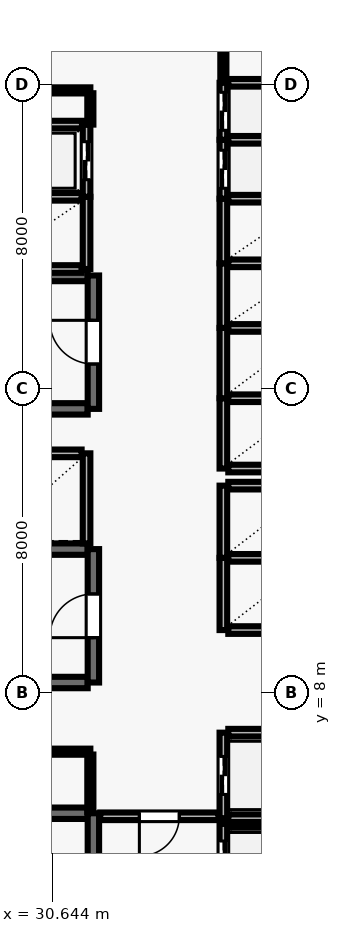
"""IFC4 building model, lengths in metres.
Left out: names, types, materials, properties, quantities, classifications, styles, units other than length and angle.
Written with IfcOpenShell. Run it as: python <this file> out.ifc"""

import sys

from ifc_helpers import new_model, si_unit, direction, frame, frame_2d, origin, place, context, subcontext, project, spatial, rectangle, extrude, element, fill, save


model = new_model("IFC4")
c1 = context("Model", 3, precision=1e-05, world=origin(), true_north=direction((0.0, 1.0)))
c2 = subcontext(c1, "Body", "Model", "MODEL_VIEW")
j1 = project(units=[si_unit("LENGTHUNIT", "METRE"), si_unit("PLANEANGLEUNIT", "RADIAN")], contexts=[c1])
p1 = place(None, origin())
s1 = spatial("IfcSite", under=j1, at=p1, CompositionType="ELEMENT")
p2 = place(p1, origin())
s2 = spatial("IfcBuilding", under=s1, at=p2, CompositionType="ELEMENT")
p3 = place(p2, frame((0.0, 0.0, 62.2)))
s3 = spatial("IfcBuildingStorey", under=s2, at=p3, CompositionType="ELEMENT", Elevation=62.2)
p4 = place(p3, frame((31.58, 4.83, 0.0), z_axis=(0.0, 0.0, 1.0), x_axis=(-1.0, 0.0, 0.0)))
e1 = element("IfcWall", 1, at=p4, inside=s3, PredefinedType="SHEAR", context=c2, shape_type="SweptSolid", body=[
    extrude(rectangle(XDim=8.36, YDim=0.3, at=frame_2d((4.18, 0.0))), origin(), (0.0, 0.0, 1.0), 3.69),
])
p5 = place(p3, frame((31.73, 0.96, 0.0), z_axis=(0.0, 0.0, 1.0), x_axis=(0.0, 1.0, 0.0)))
e2 = element("IfcWall", 2, at=p5, inside=s3, PredefinedType="SHEAR", context=c2, shape_type="SweptSolid", body=[
    extrude(rectangle(XDim=3.87, YDim=0.3, at=frame_2d((1.935, 0.0))), origin(), (0.0, 0.0, 1.0), 3.69),
])
p6 = place(p5, frame((1.54, 0.0, 0.0)))
e3 = element("IfcOpeningElement", 3, at=p6, cuts=e2, PredefinedType="OPENING", context=c2, shape_type="SweptSolid", body=[
    extrude(rectangle(XDim=1.15, YDim=2.15, at=frame_2d((0.575, 1.075))), frame((0.0, 0.16, 0.0), z_axis=(0.0, -1.0, 0.0), x_axis=(1.0, 0.0, 0.0)), (0.0, 0.0, 1.0), 0.32),
])
for number, where, z_axis, x_axis in (
    (4, (31.58, 18.98, 0.0), (0.0, 0.0, 1.0), (-1.0, 0.0, 0.0)),
    (5, (23.22, 15.47, 0.0), (0.0, 0.0, 1.0), (1.0, 0.0, 0.0)),
):
    element("IfcWall", number, at=place(p3, frame(where, z_axis=z_axis, x_axis=x_axis)), inside=s3, PredefinedType="SHEAR", context=c2, shape_type="SweptSolid", body=[
        extrude(rectangle(XDim=8.36, YDim=0.3, at=frame_2d((4.18, 0.0))), origin(), (0.0, 0.0, 1.0), 3.69),
    ])
p7 = place(p3, frame((31.73, 15.47, 0.0), z_axis=(0.0, 0.0, 1.0), x_axis=(0.0, 1.0, 0.0)))
e6 = element("IfcWall", 6, at=p7, inside=s3, PredefinedType="SHEAR", context=c2, shape_type="SweptSolid", body=[
    extrude(rectangle(XDim=3.51, YDim=0.3, at=frame_2d((1.755, 0.0))), origin(), (0.0, 0.0, 1.0), 3.69),
])
p8 = place(p7, frame((1.18, 0.0, 0.0)))
e7 = element("IfcOpeningElement", 7, at=p8, cuts=e6, PredefinedType="OPENING", context=c2, shape_type="SweptSolid", body=[
    extrude(rectangle(XDim=1.15, YDim=2.15, at=frame_2d((0.575, 1.075))), frame((0.0, 0.16, 0.0), z_axis=(0.0, -1.0, 0.0), x_axis=(1.0, 0.0, 0.0)), (0.0, 0.0, 1.0), 0.32),
])
for number, where, z_axis, x_axis in (
    (8, (31.58, 11.78, 0.0), (0.0, 0.0, 1.0), (-1.0, 0.0, 0.0)),
    (9, (23.22, 8.27, 0.0), (0.0, 0.0, 1.0), (1.0, 0.0, 0.0)),
):
    element("IfcWall", number, at=place(p3, frame(where, z_axis=z_axis, x_axis=x_axis)), inside=s3, PredefinedType="SHEAR", context=c2, shape_type="SweptSolid", body=[
        extrude(rectangle(XDim=8.36, YDim=0.3, at=frame_2d((4.18, 0.0))), origin(), (0.0, 0.0, 1.0), 3.69),
    ])
p9 = place(p3, frame((31.73, 8.27, 0.0), z_axis=(0.0, 0.0, 1.0), x_axis=(0.0, 1.0, 0.0)))
e10 = element("IfcWall", 10, at=p9, inside=s3, PredefinedType="SHEAR", context=c2, shape_type="SweptSolid", body=[
    extrude(rectangle(XDim=3.51, YDim=0.3, at=frame_2d((1.755, 0.0))), origin(), (0.0, 0.0, 1.0), 3.69),
])
p10 = place(p9, frame((1.18, 0.0, 0.0)))
e11 = element("IfcOpeningElement", 11, at=p10, cuts=e10, PredefinedType="OPENING", context=c2, shape_type="SweptSolid", body=[
    extrude(rectangle(XDim=1.15, YDim=2.15, at=frame_2d((0.575, 1.075))), frame((0.0, 0.16, 0.0), z_axis=(0.0, -1.0, 0.0), x_axis=(1.0, 0.0, 0.0)), (0.0, 0.0, 1.0), 0.32),
])
p11 = place(p3, frame((35.15, 4.55, 0.0), z_axis=(0.0, 0.0, 1.0), x_axis=(0.0, -1.0, 0.0)))
e12 = element("IfcWall", 12, at=p11, inside=s3, PredefinedType="SOLIDWALL", context=c2, shape_type="SweptSolid", body=[
    extrude(rectangle(XDim=2.1, YDim=0.2, at=frame_2d((1.05, 0.0))), origin(), (0.0, 0.0, 1.0), 3.69),
])
p12 = place(p11, frame((0.45, 0.0, 0.0)))
e13 = element("IfcOpeningElement", 13, at=p12, cuts=e12, PredefinedType="OPENING", context=c2, shape_type="SweptSolid", body=[
    extrude(rectangle(XDim=1.2, YDim=2.15, at=frame_2d((0.6, 1.075))), frame((0.0, 0.11, 0.0), z_axis=(0.0, -1.0, 0.0), x_axis=(1.0, 0.0, 0.0)), (0.0, 0.0, 1.0), 0.22),
])
p13 = place(p3, frame((37.42, 4.55, 0.0), z_axis=(0.0, 0.0, 1.0), x_axis=(-1.0, 0.0, 0.0)))
e14 = element("IfcWall", 14, at=p13, inside=s3, PredefinedType="SOLIDWALL", context=c2, shape_type="SweptSolid", body=[
    extrude(rectangle(XDim=2.14, YDim=0.2, at=frame_2d((1.07, 0.0))), origin(), (0.0, 0.0, 1.0), 3.69),
])
p14 = place(p3, frame((35.15, 6.95, 0.0), z_axis=(0.0, 0.0, 1.0), x_axis=(0.0, -1.0, 0.0)))
e15 = element("IfcWall", 15, at=p14, inside=s3, PredefinedType="SOLIDWALL", context=c2, shape_type="SweptSolid", body=[
    extrude(rectangle(XDim=2.25, YDim=0.2, at=frame_2d((1.125, 0.0))), origin(), (0.0, 0.0, 1.0), 3.69),
])
p15 = place(p14, frame((0.625, 0.0, 0.0)))
e16 = element("IfcOpeningElement", 16, at=p15, cuts=e15, PredefinedType="OPENING", context=c2, shape_type="SweptSolid", body=[
    extrude(rectangle(XDim=1.0, YDim=2.1, at=frame_2d((0.5, 1.05))), frame((0.0, 0.11, 0.0), z_axis=(0.0, -1.0, 0.0), x_axis=(1.0, 0.0, 0.0)), (0.0, 0.0, 1.0), 0.22),
])
for number, where, z_axis, x_axis in (
    (17, (35.28, 4.7, 0.0), (0.0, 0.0, 1.0), (1.0, 0.0, 0.0)),
    (18, (37.42, 6.95, 0.0), (0.0, 0.0, 1.0), (-1.0, 0.0, 0.0)),
):
    element("IfcWall", number, at=place(p3, frame(where, z_axis=z_axis, x_axis=x_axis)), inside=s3, PredefinedType="SOLIDWALL", context=c2, shape_type="SweptSolid", body=[
        extrude(rectangle(XDim=2.14, YDim=0.2, at=frame_2d((1.07, 0.0))), origin(), (0.0, 0.0, 1.0), 3.69),
    ])
p16 = place(p3, frame((35.15, 11.55, 0.0), z_axis=(0.0, 0.0, 1.0), x_axis=(0.0, -1.0, 0.0)))
e19 = element("IfcWall", 19, at=p16, inside=s3, PredefinedType="SOLIDWALL", context=c2, shape_type="SweptSolid", body=[
    extrude(rectangle(XDim=1.9, YDim=0.2, at=frame_2d((0.95, 0.0))), origin(), (0.0, 0.0, 1.0), 3.69),
])
for number, where, z_axis, x_axis in (
    (20, (35.28, 9.65, 0.0), (0.0, 0.0, 1.0), (1.0, 0.0, 0.0)),
    (21, (37.42, 11.55, 0.0), (0.0, 0.0, 1.0), (-1.0, 0.0, 0.0)),
):
    element("IfcWall", number, at=place(p3, frame(where, z_axis=z_axis, x_axis=x_axis)), inside=s3, PredefinedType="SOLIDWALL", context=c2, shape_type="SweptSolid", body=[
        extrude(rectangle(XDim=2.14, YDim=0.2, at=frame_2d((1.07, 0.0))), origin(), (0.0, 0.0, 1.0), 3.69),
    ])
p17 = place(p3, frame((35.15, 13.45, 0.0), z_axis=(0.0, 0.0, 1.0), x_axis=(0.0, -1.0, 0.0)))
e22 = element("IfcWall", 22, at=p17, inside=s3, PredefinedType="SOLIDWALL", context=c2, shape_type="SweptSolid", body=[
    extrude(rectangle(XDim=1.9, YDim=0.2, at=frame_2d((0.95, 0.0))), origin(), (0.0, 0.0, 1.0), 3.69),
])
p18 = place(p3, frame((37.42, 13.45, 0.0), z_axis=(0.0, 0.0, 1.0), x_axis=(-1.0, 0.0, 0.0)))
e23 = element("IfcWall", 23, at=p18, inside=s3, PredefinedType="SOLIDWALL", context=c2, shape_type="SweptSolid", body=[
    extrude(rectangle(XDim=2.14, YDim=0.2, at=frame_2d((1.07, 0.0))), origin(), (0.0, 0.0, 1.0), 3.69),
])
p19 = place(p3, frame((31.55, 11.93, 0.0), z_axis=(0.0, 0.0, 1.0), x_axis=(0.0, 1.0, 0.0)))
e24 = element("IfcWall", 24, at=p19, inside=s3, PredefinedType="SOLIDWALL", context=c2, shape_type="SweptSolid", body=[
    extrude(rectangle(XDim=2.37, YDim=0.2, at=frame_2d((1.185, 0.0))), origin(), (0.0, 0.0, 1.0), 3.69),
])
p20 = place(p3, frame((31.42, 14.3, 0.0), z_axis=(0.0, 0.0, 1.0), x_axis=(-1.0, 0.0, 0.0)))
e25 = element("IfcWall", 25, at=p20, inside=s3, PredefinedType="SOLIDWALL", context=c2, shape_type="SweptSolid", body=[
    extrude(rectangle(XDim=2.44, YDim=0.2, at=frame_2d((1.22, 0.0))), origin(), (0.0, 0.0, 1.0), 3.69),
])
p21 = place(p3, frame((35.15, 15.75, 0.0), z_axis=(0.0, 0.0, 1.0), x_axis=(0.0, -1.0, 0.0)))
e26 = element("IfcWall", 26, at=p21, inside=s3, PredefinedType="SOLIDWALL", context=c2, shape_type="SweptSolid", body=[
    extrude(rectangle(XDim=1.85, YDim=0.2, at=frame_2d((0.925, 0.0))), origin(), (0.0, 0.0, 1.0), 3.69),
])
for number, where, z_axis, x_axis in (
    (27, (35.28, 13.9, 0.0), (0.0, 0.0, 1.0), (1.0, 0.0, 0.0)),
    (28, (37.42, 15.75, 0.0), (0.0, 0.0, 1.0), (-1.0, 0.0, 0.0)),
):
    element("IfcWall", number, at=place(p3, frame(where, z_axis=z_axis, x_axis=x_axis)), inside=s3, PredefinedType="SOLIDWALL", context=c2, shape_type="SweptSolid", body=[
        extrude(rectangle(XDim=2.14, YDim=0.2, at=frame_2d((1.07, 0.0))), origin(), (0.0, 0.0, 1.0), 3.69),
    ])
p22 = place(p3, frame((35.15, 17.6, 0.0), z_axis=(0.0, 0.0, 1.0), x_axis=(0.0, -1.0, 0.0)))
e29 = element("IfcWall", 29, at=p22, inside=s3, PredefinedType="SOLIDWALL", context=c2, shape_type="SweptSolid", body=[
    extrude(rectangle(XDim=1.85, YDim=0.2, at=frame_2d((0.925, 0.0))), origin(), (0.0, 0.0, 1.0), 3.69),
])
p23 = place(p3, frame((37.42, 17.6, 0.0), z_axis=(0.0, 0.0, 1.0), x_axis=(-1.0, 0.0, 0.0)))
e30 = element("IfcWall", 30, at=p23, inside=s3, PredefinedType="SOLIDWALL", context=c2, shape_type="SweptSolid", body=[
    extrude(rectangle(XDim=2.14, YDim=0.2, at=frame_2d((1.07, 0.0))), origin(), (0.0, 0.0, 1.0), 3.69),
])
p24 = place(p3, frame((35.15, 19.3, 0.0), z_axis=(0.0, 0.0, 1.0), x_axis=(0.0, -1.0, 0.0)))
e31 = element("IfcWall", 31, at=p24, inside=s3, PredefinedType="SOLIDWALL", context=c2, shape_type="SweptSolid", body=[
    extrude(rectangle(XDim=1.7, YDim=0.2, at=frame_2d((0.85, 0.0))), origin(), (0.0, 0.0, 1.0), 3.69),
])
p25 = place(p3, frame((37.42, 19.3, 0.0), z_axis=(0.0, 0.0, 1.0), x_axis=(-1.0, 0.0, 0.0)))
e32 = element("IfcWall", 32, at=p25, inside=s3, PredefinedType="SOLIDWALL", context=c2, shape_type="SweptSolid", body=[
    extrude(rectangle(XDim=2.14, YDim=0.2, at=frame_2d((1.07, 0.0))), origin(), (0.0, 0.0, 1.0), 3.69),
])
p26 = place(p3, frame((35.15, 21.0, 0.0), z_axis=(0.0, 0.0, 1.0), x_axis=(0.0, -1.0, 0.0)))
e33 = element("IfcWall", 33, at=p26, inside=s3, PredefinedType="SOLIDWALL", context=c2, shape_type="SweptSolid", body=[
    extrude(rectangle(XDim=1.7, YDim=0.2, at=frame_2d((0.85, 0.0))), origin(), (0.0, 0.0, 1.0), 3.69),
])
p27 = place(p3, frame((37.42, 21.0, 0.0), z_axis=(0.0, 0.0, 1.0), x_axis=(-1.0, 0.0, 0.0)))
e34 = element("IfcWall", 34, at=p27, inside=s3, PredefinedType="SOLIDWALL", context=c2, shape_type="SweptSolid", body=[
    extrude(rectangle(XDim=2.14, YDim=0.2, at=frame_2d((1.07, 0.0))), origin(), (0.0, 0.0, 1.0), 3.69),
])
p28 = place(p3, frame((31.55, 19.15, 0.0), z_axis=(0.0, 0.0, 1.0), x_axis=(0.0, 1.0, 0.0)))
e35 = element("IfcWall", 35, at=p28, inside=s3, PredefinedType="SOLIDWALL", context=c2, shape_type="SweptSolid", body=[
    extrude(rectangle(XDim=1.9, YDim=0.2, at=frame_2d((0.95, 0.0))), origin(), (0.0, 0.0, 1.0), 3.69),
])
for number, where, z_axis, x_axis in (
    (36, (28.98, 19.15, 0.0), (0.0, 0.0, 1.0), (1.0, 0.0, 0.0)),
    (37, (31.42, 21.05, 0.0), (0.0, 0.0, 1.0), (-1.0, 0.0, 0.0)),
):
    element("IfcWall", number, at=place(p3, frame(where, z_axis=z_axis, x_axis=x_axis)), inside=s3, PredefinedType="SOLIDWALL", context=c2, shape_type="SweptSolid", body=[
        extrude(rectangle(XDim=2.44, YDim=0.2, at=frame_2d((1.22, 0.0))), origin(), (0.0, 0.0, 1.0), 3.69),
    ])
p29 = place(p3, frame((35.15, 22.55, 0.0), z_axis=(0.0, 0.0, 1.0), x_axis=(0.0, -1.0, 0.0)))
e38 = element("IfcWall", 38, at=p29, inside=s3, PredefinedType="SOLIDWALL", context=c2, shape_type="SweptSolid", body=[
    extrude(rectangle(XDim=1.55, YDim=0.2, at=frame_2d((0.775, 0.0))), origin(), (0.0, 0.0, 1.0), 3.69),
])
p30 = place(p29, frame((0.275, 0.0, 0.0)))
e39 = element("IfcOpeningElement", 39, at=p30, cuts=e38, PredefinedType="OPENING", context=c2, shape_type="SweptSolid", body=[
    extrude(rectangle(XDim=1.0, YDim=2.1, at=frame_2d((0.5, 1.05))), frame((0.0, 0.11, 0.0), z_axis=(0.0, -1.0, 0.0), x_axis=(1.0, 0.0, 0.0)), (0.0, 0.0, 1.0), 0.22),
])
p31 = place(p3, frame((37.42, 22.55, 0.0), z_axis=(0.0, 0.0, 1.0), x_axis=(-1.0, 0.0, 0.0)))
e40 = element("IfcWall", 40, at=p31, inside=s3, PredefinedType="SOLIDWALL", context=c2, shape_type="SweptSolid", body=[
    extrude(rectangle(XDim=2.14, YDim=0.2, at=frame_2d((1.07, 0.0))), origin(), (0.0, 0.0, 1.0), 3.69),
])
p32 = place(p3, frame((35.15, 24.05, 0.0), z_axis=(0.0, 0.0, 1.0), x_axis=(0.0, -1.0, 0.0)))
e41 = element("IfcWall", 41, at=p32, inside=s3, PredefinedType="SOLIDWALL", context=c2, shape_type="SweptSolid", body=[
    extrude(rectangle(XDim=1.5, YDim=0.2, at=frame_2d((0.75, 0.0))), origin(), (0.0, 0.0, 1.0), 3.69),
])
p33 = place(p32, frame((0.25, 0.0, 0.0)))
e42 = element("IfcOpeningElement", 42, at=p33, cuts=e41, PredefinedType="OPENING", context=c2, shape_type="SweptSolid", body=[
    extrude(rectangle(XDim=1.0, YDim=2.1, at=frame_2d((0.5, 1.05))), frame((0.0, 0.11, 0.0), z_axis=(0.0, -1.0, 0.0), x_axis=(1.0, 0.0, 0.0)), (0.0, 0.0, 1.0), 0.22),
])
p34 = place(p3, frame((37.42, 24.05, 0.0), z_axis=(0.0, 0.0, 1.0), x_axis=(-1.0, 0.0, 0.0)))
e43 = element("IfcWall", 43, at=p34, inside=s3, PredefinedType="SOLIDWALL", context=c2, shape_type="SweptSolid", body=[
    extrude(rectangle(XDim=2.14, YDim=0.2, at=frame_2d((1.07, 0.0))), origin(), (0.0, 0.0, 1.0), 3.69),
])
p35 = place(p3, frame((31.55, 21.05, 0.0), z_axis=(0.0, 0.0, 1.0), x_axis=(0.0, 1.0, 0.0)))
e44 = element("IfcWall", 44, at=p35, inside=s3, PredefinedType="SOLIDWALL", context=c2, shape_type="SweptSolid", body=[
    extrude(rectangle(XDim=1.9, YDim=0.2, at=frame_2d((0.95, 0.0))), origin(), (0.0, 0.0, 1.0), 3.69),
])
p36 = place(p35, frame((0.45, 0.0, 0.0)))
e45 = element("IfcOpeningElement", 45, at=p36, cuts=e44, PredefinedType="OPENING", context=c2, shape_type="SweptSolid", body=[
    extrude(rectangle(XDim=1.0, YDim=2.1, at=frame_2d((0.5, 1.05))), frame((0.0, 0.11, 0.0), z_axis=(0.0, -1.0, 0.0), x_axis=(1.0, 0.0, 0.0)), (0.0, 0.0, 1.0), 0.22),
])
p37 = place(p3, frame((31.43, 22.95, 0.0), z_axis=(0.0, 0.0, 1.0), x_axis=(-1.0, 0.0, 0.0)))
e46 = element("IfcWall", 46, at=p37, inside=s3, PredefinedType="SOLIDWALL", context=c2, shape_type="SweptSolid", body=[
    extrude(rectangle(XDim=2.46, YDim=0.2, at=frame_2d((1.23, 0.0))), origin(), (0.0, 0.0, 1.0), 3.69),
])
p38 = place(p3, frame((28.55, 6.45, 0.0), z_axis=(0.0, 0.0, 1.0), x_axis=(1.0, 0.0, 0.0)))
e47 = element("IfcWall", 47, at=p38, inside=s3, PredefinedType="PARTITIONING", context=c2, shape_type="SweptSolid", body=[
    extrude(rectangle(XDim=3.1, YDim=0.16, at=frame_2d((1.55, 0.0))), origin(), (0.0, 0.0, 1.0), 3.69),
])
p39 = place(p38, frame((1.11, 0.0, 0.0)))
e48 = element("IfcOpeningElement", 48, at=p39, cuts=e47, PredefinedType="OPENING", context=c2, shape_type="SweptSolid", body=[
    extrude(rectangle(XDim=0.88, YDim=2.1, at=frame_2d((0.44, 1.05))), frame((0.0, 0.09, 0.0), z_axis=(0.0, -1.0, 0.0), x_axis=(1.0, 0.0, 0.0)), (0.0, 0.0, 1.0), 0.18),
])
p40 = place(p3, frame((28.8, 23.85, 0.0), z_axis=(0.0, 0.0, 1.0), x_axis=(1.0, 0.0, 0.0)))
e49 = element("IfcWall", 49, at=p40, inside=s3, PredefinedType="PARTITIONING", context=c2, shape_type="SweptSolid", body=[
    extrude(rectangle(XDim=2.85, YDim=0.16, at=frame_2d((1.425, 0.0))), origin(), (0.0, 0.0, 1.0), 3.69),
])
p41 = place(p3, frame((35.02, 4.75, 0.0), z_axis=(0.0, 0.0, 1.0), x_axis=(-1.0, 0.0, 0.0)))
e50 = element("IfcWall", 50, at=p41, inside=s3, PredefinedType="SOLIDWALL", context=c2, shape_type="SweptSolid", body=[
    extrude(rectangle(XDim=3.11, YDim=0.2, at=frame_2d((1.555, 0.0))), origin(), (0.0, 0.0, 1.0), 3.69),
])
p42 = place(p41, frame((1.03, 0.0, 0.0)))
e51 = element("IfcOpeningElement", 51, at=p42, cuts=e50, PredefinedType="OPENING", context=c2, shape_type="SweptSolid", body=[
    extrude(rectangle(XDim=1.05, YDim=2.15, at=frame_2d((0.525, 1.075))), frame((0.0, 0.11, 0.0), z_axis=(0.0, -1.0, 0.0), x_axis=(1.0, 0.0, 0.0)), (0.0, 0.0, 1.0), 0.22),
])
p43 = place(p3, frame((31.65, 4.86, 0.0), z_axis=(0.0, 0.0, 1.0), x_axis=(0.0, 1.0, 0.0)))
e52 = element("IfcWall", 52, at=p43, inside=s3, PredefinedType="PARTITIONING", context=c2, shape_type="SweptSolid", body=[
    extrude(rectangle(XDim=1.515, YDim=0.16, at=frame_2d((0.757, 0.0))), origin(), (0.0, 0.0, 1.0), 3.69),
])
p44 = place(p3, frame((31.65, 23.775, 0.0), z_axis=(0.0, 0.0, 1.0), x_axis=(0.0, -1.0, 0.0)))
e53 = element("IfcWall", 53, at=p44, inside=s3, PredefinedType="PARTITIONING", context=c2, shape_type="SweptSolid", body=[
    extrude(rectangle(XDim=0.825, YDim=0.16, at=frame_2d((0.413, 0.0))), origin(), (0.0, 0.0, 1.0), 3.69),
])
p45 = place(p3, frame((35.15, 24.07, 0.0), z_axis=(0.0, 0.0, 1.0), x_axis=(0.0, 1.0, 0.0)))
e54 = element("IfcWall", 54, at=p45, inside=s3, PredefinedType="PARTITIONING", context=c2, shape_type="SweptSolid", body=[
    extrude(rectangle(XDim=1.855, YDim=0.16, at=frame_2d((0.927, 0.0))), origin(), (0.0, 0.0, 1.0), 3.69),
])
p46 = place(p8, origin())
e55 = element("IfcDoor", 55, at=p46, inside=s3, OperationType="SINGLE_SWING_RIGHT", PredefinedType="DOOR", context=c2, shape_type="SweptSolid", body=[
    extrude(rectangle(XDim=1.15, YDim=2.15, at=frame_2d((0.575, 1.075))), frame((0.0, 0.025, 0.0), z_axis=(0.0, -1.0, 0.0), x_axis=(1.0, 0.0, 0.0)), (0.0, 0.0, 1.0), 0.05),
])
fill(e7, e55)
p47 = place(p10, origin())
e56 = element("IfcDoor", 56, at=p47, inside=s3, OperationType="SINGLE_SWING_LEFT", PredefinedType="DOOR", context=c2, shape_type="SweptSolid", body=[
    extrude(rectangle(XDim=1.15, YDim=2.15, at=frame_2d((0.575, 1.075))), frame((0.0, 0.025, 0.0), z_axis=(0.0, -1.0, 0.0), x_axis=(1.0, 0.0, 0.0)), (0.0, 0.0, 1.0), 0.05),
])
fill(e11, e56)
p48 = place(p12, origin())
e57 = element("IfcDoor", 57, at=p48, inside=s3, OperationType="DOUBLE_DOOR_SLIDING", PredefinedType="DOOR", context=c2, shape_type="SweptSolid", body=[
    extrude(rectangle(XDim=1.2, YDim=2.15, at=frame_2d((0.6, 1.075))), frame((0.0, 0.025, 0.0), z_axis=(0.0, -1.0, 0.0), x_axis=(1.0, 0.0, 0.0)), (0.0, 0.0, 1.0), 0.05),
])
fill(e13, e57)
p49 = place(p15, origin())
e58 = element("IfcDoor", 58, at=p49, inside=s3, OperationType="DOUBLE_DOOR_SLIDING", PredefinedType="DOOR", context=c2, shape_type="SweptSolid", body=[
    extrude(rectangle(XDim=1.0, YDim=2.1, at=frame_2d((0.5, 1.05))), frame((0.0, 0.025, 0.0), z_axis=(0.0, -1.0, 0.0), x_axis=(1.0, 0.0, 0.0)), (0.0, 0.0, 1.0), 0.05),
])
fill(e16, e58)
p50 = place(p30, origin())
e59 = element("IfcDoor", 59, at=p50, inside=s3, OperationType="DOUBLE_DOOR_SLIDING", PredefinedType="DOOR", context=c2, shape_type="SweptSolid", body=[
    extrude(rectangle(XDim=1.0, YDim=2.1, at=frame_2d((0.5, 1.05))), frame((0.0, 0.025, 0.0), z_axis=(0.0, -1.0, 0.0), x_axis=(1.0, 0.0, 0.0)), (0.0, 0.0, 1.0), 0.05),
])
fill(e39, e59)
p51 = place(p33, origin())
e60 = element("IfcDoor", 60, at=p51, inside=s3, OperationType="DOUBLE_DOOR_SLIDING", PredefinedType="DOOR", context=c2, shape_type="SweptSolid", body=[
    extrude(rectangle(XDim=1.0, YDim=2.1, at=frame_2d((0.5, 1.05))), frame((0.0, 0.025, 0.0), z_axis=(0.0, -1.0, 0.0), x_axis=(1.0, 0.0, 0.0)), (0.0, 0.0, 1.0), 0.05),
])
fill(e42, e60)
p52 = place(p36, origin())
e61 = element("IfcDoor", 61, at=p52, inside=s3, OperationType="DOUBLE_DOOR_SLIDING", PredefinedType="DOOR", context=c2, shape_type="SweptSolid", body=[
    extrude(rectangle(XDim=1.0, YDim=2.1, at=frame_2d((0.5, 1.05))), frame((0.0, 0.025, 0.0), z_axis=(0.0, -1.0, 0.0), x_axis=(1.0, 0.0, 0.0)), (0.0, 0.0, 1.0), 0.05),
])
fill(e45, e61)
p53 = place(p42, origin())
e62 = element("IfcDoor", 62, at=p53, inside=s3, OperationType="SINGLE_SWING_RIGHT", PredefinedType="DOOR", context=c2, shape_type="SweptSolid", body=[
    extrude(rectangle(XDim=1.05, YDim=2.15, at=frame_2d((0.525, 1.075))), frame((0.0, 0.025, 0.0), z_axis=(0.0, -1.0, 0.0), x_axis=(1.0, 0.0, 0.0)), (0.0, 0.0, 1.0), 0.05),
])
fill(e51, e62)
save(model, sys.argv[1])
